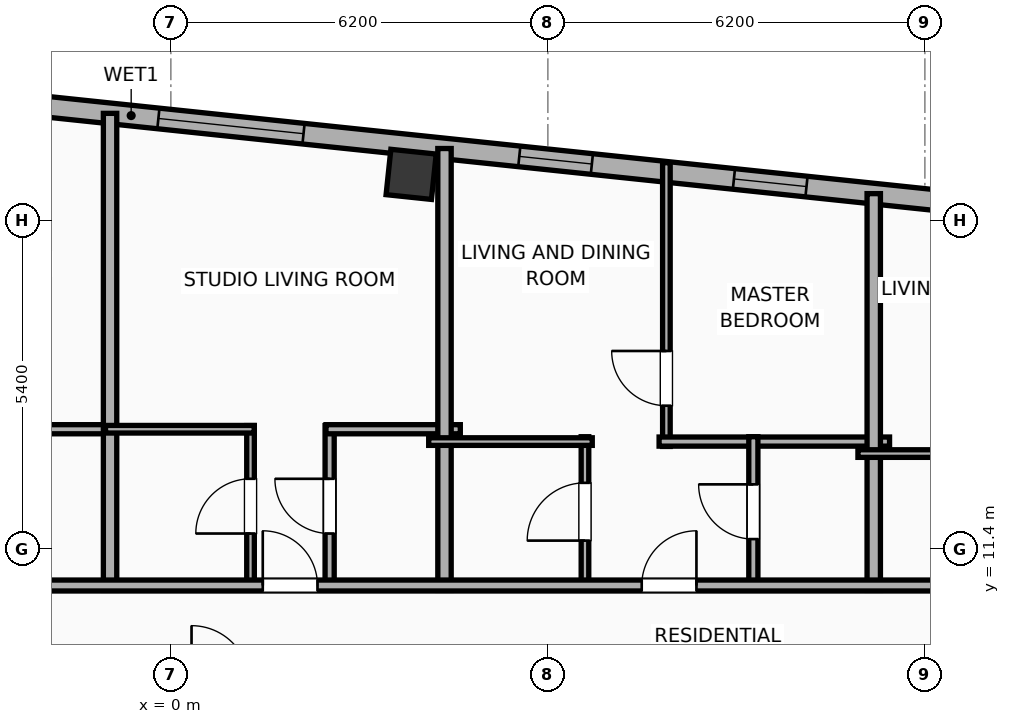
"""IFC4 building model, lengths in metres.
Left out: names, types, materials, properties, quantities, classifications, styles, units other than length and angle.
Written with IfcOpenShell. Run it as: python <this file> out.ifc"""

import sys

from ifc_helpers import new_model, si_unit, direction, frame, frame_2d, origin, origin_2d, place, context, subcontext, project, spatial, rectangle, hollow_rectangle, extrude, element, fill, save


model = new_model("IFC4")
c1 = context("Model", 3, precision=1e-05, world=origin(), true_north=direction((0.0, 1.0)))
c2 = subcontext(c1, "Body", "Model", "MODEL_VIEW")
j1 = project(units=[si_unit("LENGTHUNIT", "METRE"), si_unit("PLANEANGLEUNIT", "RADIAN")], contexts=[c1])
p1 = place(None, origin())
s1 = spatial("IfcSite", under=j1, at=p1, CompositionType="ELEMENT")
p2 = place(p1, origin())
s2 = spatial("IfcBuilding", under=s1, at=p2, CompositionType="ELEMENT")
p3 = place(p2, frame((0.0, 0.0, 279.5)))
s3 = spatial("IfcBuildingStorey", under=s2, at=p3, CompositionType="ELEMENT", Elevation=279.5)
p4 = place(p3, frame((3.952, 17.561, 0.0), z_axis=(0.0, 0.0, 1.0), x_axis=(0.994521895368, -0.104528463268, 0.0)))
e1 = element("IfcColumn", 1, at=p4, inside=s3, PredefinedType="COLUMN", context=c2, shape_type="SweptSolid", body=[
    extrude(hollow_rectangle(XDim=0.75, YDim=0.75, WallThickness=0.025, at=origin_2d()), origin(), (0.0, 0.0, 1.0), 3.9),
])
p5 = place(p3, frame((-23.908, 20.972, 0.0), z_axis=(0.0, 0.0, 1.0), x_axis=(0.994521888554, -0.104528528102, 0.0)))
e2 = element("IfcWall", 2, at=p5, inside=s3, PredefinedType="ELEMENTEDWALL", context=c2, shape_type="SweptSolid", body=[
    extrude(rectangle(XDim=46.766, YDim=0.34, at=frame_2d((23.383, 0.0))), origin(), (0.0, 0.0, 1.0), 3.65),
])
p6 = place(p5, frame((23.833, 0.0, 0.75)))
e3 = element("IfcOpeningElement", 3, at=p6, cuts=e2, PredefinedType="OPENING", context=c2, shape_type="SweptSolid", body=[
    extrude(rectangle(XDim=2.4, YDim=2.1, at=frame_2d((1.2, 1.05))), frame((0.0, 0.18, 0.0), z_axis=(0.0, -1.0, 0.0), x_axis=(1.0, 0.0, 0.0)), (0.0, 0.0, 1.0), 0.36),
])
p7 = place(p5, frame((1.243, 0.0, 0.75)))
e4 = element("IfcOpeningElement", 4, at=p7, cuts=e2, PredefinedType="OPENING", context=c2, shape_type="SweptSolid", body=[
    extrude(rectangle(XDim=1.2, YDim=2.05, at=frame_2d((0.6, 1.025))), frame((0.0, 0.18, 0.0), z_axis=(0.0, -1.0, 0.0), x_axis=(1.0, 0.0, 0.0)), (0.0, 0.0, 1.0), 0.36),
])
p8 = place(p5, frame((4.157, 0.0, 0.75)))
e5 = element("IfcOpeningElement", 5, at=p8, cuts=e2, PredefinedType="OPENING", context=c2, shape_type="SweptSolid", body=[
    extrude(rectangle(XDim=1.2, YDim=2.05, at=frame_2d((0.6, 1.025))), frame((0.0, 0.18, 0.0), z_axis=(0.0, -1.0, 0.0), x_axis=(1.0, 0.0, 0.0)), (0.0, 0.0, 1.0), 0.36),
])
p9 = place(p5, frame((7.475, 0.0, 0.75)))
e6 = element("IfcOpeningElement", 6, at=p9, cuts=e2, PredefinedType="OPENING", context=c2, shape_type="SweptSolid", body=[
    extrude(rectangle(XDim=1.2, YDim=2.05, at=frame_2d((0.6, 1.025))), frame((0.0, 0.18, 0.0), z_axis=(0.0, -1.0, 0.0), x_axis=(1.0, 0.0, 0.0)), (0.0, 0.0, 1.0), 0.36),
])
p10 = place(p5, frame((11.513, 0.0, 0.75)))
e7 = element("IfcOpeningElement", 7, at=p10, cuts=e2, PredefinedType="OPENING", context=c2, shape_type="SweptSolid", body=[
    extrude(rectangle(XDim=1.2, YDim=2.05, at=frame_2d((0.6, 1.025))), frame((0.0, 0.18, 0.0), z_axis=(0.0, -1.0, 0.0), x_axis=(1.0, 0.0, 0.0)), (0.0, 0.0, 1.0), 0.36),
])
p11 = place(p5, frame((15.192, 0.0, 0.75)))
e8 = element("IfcOpeningElement", 8, at=p11, cuts=e2, PredefinedType="OPENING", context=c2, shape_type="SweptSolid", body=[
    extrude(rectangle(XDim=1.2, YDim=2.05, at=frame_2d((0.6, 1.025))), frame((0.0, 0.18, 0.0), z_axis=(0.0, -1.0, 0.0), x_axis=(1.0, 0.0, 0.0)), (0.0, 0.0, 1.0), 0.36),
])
p12 = place(p5, frame((19.671, 0.0, 0.75)))
e9 = element("IfcOpeningElement", 9, at=p12, cuts=e2, PredefinedType="OPENING", context=c2, shape_type="SweptSolid", body=[
    extrude(rectangle(XDim=1.2, YDim=2.05, at=frame_2d((0.6, 1.025))), frame((0.0, 0.18, 0.0), z_axis=(0.0, -1.0, 0.0), x_axis=(1.0, 0.0, 0.0)), (0.0, 0.0, 1.0), 0.36),
])
p13 = place(p5, frame((29.801, 0.0, 0.75)))
e10 = element("IfcOpeningElement", 10, at=p13, cuts=e2, PredefinedType="OPENING", context=c2, shape_type="SweptSolid", body=[
    extrude(rectangle(XDim=1.2, YDim=2.05, at=frame_2d((0.6, 1.025))), frame((0.0, 0.18, 0.0), z_axis=(0.0, -1.0, 0.0), x_axis=(1.0, 0.0, 0.0)), (0.0, 0.0, 1.0), 0.36),
])
p14 = place(p5, frame((33.35, 0.0, 0.75)))
e11 = element("IfcOpeningElement", 11, at=p14, cuts=e2, PredefinedType="OPENING", context=c2, shape_type="SweptSolid", body=[
    extrude(rectangle(XDim=1.2, YDim=2.05, at=frame_2d((0.6, 1.025))), frame((0.0, 0.18, 0.0), z_axis=(0.0, -1.0, 0.0), x_axis=(1.0, 0.0, 0.0)), (0.0, 0.0, 1.0), 0.36),
])
p15 = place(p5, frame((38.034, 0.0, 0.75)))
e12 = element("IfcOpeningElement", 12, at=p15, cuts=e2, PredefinedType="OPENING", context=c2, shape_type="SweptSolid", body=[
    extrude(rectangle(XDim=0.85, YDim=2.05, at=frame_2d((0.425, 1.025))), frame((0.0, 0.18, 0.0), z_axis=(0.0, -1.0, 0.0), x_axis=(1.0, 0.0, 0.0)), (0.0, 0.0, 1.0), 0.36),
])
p16 = place(p5, frame((40.448, 0.0, 0.75)))
e13 = element("IfcOpeningElement", 13, at=p16, cuts=e2, PredefinedType="OPENING", context=c2, shape_type="SweptSolid", body=[
    extrude(rectangle(XDim=1.2, YDim=2.05, at=frame_2d((0.6, 1.025))), frame((0.0, 0.18, 0.0), z_axis=(0.0, -1.0, 0.0), x_axis=(1.0, 0.0, 0.0)), (0.0, 0.0, 1.0), 0.36),
])
p17 = place(p5, frame((43.718, 0.0, 0.75)))
e14 = element("IfcOpeningElement", 14, at=p17, cuts=e2, PredefinedType="OPENING", context=c2, shape_type="SweptSolid", body=[
    extrude(rectangle(XDim=1.2, YDim=2.05, at=frame_2d((0.6, 1.025))), frame((0.0, 0.18, 0.0), z_axis=(0.0, -1.0, 0.0), x_axis=(1.0, 0.0, 0.0)), (0.0, 0.0, 1.0), 0.36),
])
p18 = place(p3, frame((-2.949, 13.37, 0.0), z_axis=(0.0, 0.0, 1.0), x_axis=(1.0, 0.0, 0.0)))
e15 = element("IfcWall", 15, at=p18, inside=s3, PredefinedType="PLUMBINGWALL", context=c2, shape_type="SweptSolid", body=[
    extrude(rectangle(XDim=2.024, YDim=0.15, at=frame_2d((1.012, 0.0))), origin(), (0.0, 0.0, 1.0), 3.65),
])
p19 = place(p3, frame((-1.0, 10.72, 0.0), z_axis=(0.0, 0.0, 1.0), x_axis=(0.0, 1.0, 0.0)))
e16 = element("IfcWall", 16, at=p19, inside=s3, PredefinedType="PARTITIONING", context=c2, shape_type="SweptSolid", body=[
    extrude(rectangle(XDim=7.844, YDim=0.22, at=frame_2d((3.922, 0.0))), origin(), (0.0, 0.0, 1.0), 3.65),
])
p20 = place(p3, frame((1.31, 10.78, 0.0), z_axis=(0.0, 0.0, 1.0), x_axis=(0.0, 1.0, 0.0)))
e17 = element("IfcWall", 17, at=p20, inside=s3, PredefinedType="PARTITIONING", context=c2, shape_type="SweptSolid", body=[
    extrude(rectangle(XDim=2.65, YDim=0.125, at=frame_2d((1.325, 0.0))), origin(), (0.0, 0.0, 1.0), 3.65),
])
p21 = place(p20, frame((0.875, 0.0, 0.0)))
e18 = element("IfcOpeningElement", 18, at=p21, cuts=e17, PredefinedType="OPENING", context=c2, shape_type="SweptSolid", body=[
    extrude(rectangle(XDim=0.9, YDim=2.05, at=frame_2d((0.45, 1.025))), frame((0.0, 0.073, 0.0), z_axis=(0.0, -1.0, 0.0), x_axis=(1.0, 0.0, 0.0)), (0.0, 0.0, 1.0), 0.145),
])
p22 = place(p3, frame((2.611, 10.78, 0.0), z_axis=(0.0, 0.0, 1.0), x_axis=(0.0, 1.0, 0.0)))
e19 = element("IfcWall", 19, at=p22, inside=s3, PredefinedType="PLUMBINGWALL", context=c2, shape_type="SweptSolid", body=[
    extrude(rectangle(XDim=2.65, YDim=0.15, at=frame_2d((1.325, 0.0))), origin(), (0.0, 0.0, 1.0), 3.65),
])
p23 = place(p22, frame((0.875, 0.0, 0.0)))
e20 = element("IfcOpeningElement", 20, at=p23, cuts=e19, PredefinedType="OPENING", context=c2, shape_type="SweptSolid", body=[
    extrude(rectangle(XDim=0.9, YDim=2.05, at=frame_2d((0.45, 1.025))), frame((0.0, 0.085, 0.0), z_axis=(0.0, -1.0, 0.0), x_axis=(1.0, 0.0, 0.0)), (0.0, 0.0, 1.0), 0.17),
])
p24 = place(p3, frame((-1.075, 13.37, 0.0), z_axis=(0.0, 0.0, 1.0), x_axis=(1.0, 0.0, 0.0)))
e21 = element("IfcWall", 21, at=p24, inside=s3, PredefinedType="PARTITIONING", context=c2, shape_type="SweptSolid", body=[
    extrude(rectangle(XDim=2.445, YDim=0.125, at=frame_2d((1.223, 0.0))), origin(), (0.0, 0.0, 1.0), 3.65),
])
p25 = place(p3, frame((2.551, 13.37, 0.0), z_axis=(0.0, 0.0, 1.0), x_axis=(1.0, 0.0, 0.0)))
e22 = element("IfcWall", 22, at=p25, inside=s3, PredefinedType="PLUMBINGWALL", context=c2, shape_type="SweptSolid", body=[
    extrude(rectangle(XDim=2.209, YDim=0.15, at=frame_2d((1.104, 0.0))), origin(), (0.0, 0.0, 1.0), 3.65),
])
p26 = place(p3, frame((4.5, 10.72, 0.0), z_axis=(0.0, 0.0, 1.0), x_axis=(0.0, 1.0, 0.0)))
e23 = element("IfcWall", 23, at=p26, inside=s3, PredefinedType="PARTITIONING", context=c2, shape_type="SweptSolid", body=[
    extrude(rectangle(XDim=7.266, YDim=0.22, at=frame_2d((3.633, 0.0))), origin(), (0.0, 0.0, 1.0), 3.65),
])
p27 = place(p3, frame((8.149, 13.087, 0.0), z_axis=(0.0, 0.0, 1.0), x_axis=(0.0, 1.0, 0.0)))
e24 = element("IfcWall", 24, at=p27, inside=s3, PredefinedType="PARTITIONING", context=c2, shape_type="SweptSolid", body=[
    extrude(rectangle(XDim=4.667, YDim=0.125, at=frame_2d((2.333, 0.0))), origin(), (0.0, 0.0, 1.0), 3.65),
])
p28 = place(p27, frame((0.67, 0.0, 0.0)))
e25 = element("IfcOpeningElement", 25, at=p28, cuts=e24, PredefinedType="OPENING", context=c2, shape_type="SweptSolid", body=[
    extrude(rectangle(XDim=0.9, YDim=2.05, at=frame_2d((0.45, 1.025))), frame((0.0, 0.073, 0.0), z_axis=(0.0, -1.0, 0.0), x_axis=(1.0, 0.0, 0.0)), (0.0, 0.0, 1.0), 0.145),
])
p29 = place(p3, frame((8.029, 13.167, 0.0), z_axis=(0.0, 0.0, 1.0), x_axis=(1.0, 0.0, 0.0)))
e26 = element("IfcWall", 26, at=p29, inside=s3, PredefinedType="PLUMBINGWALL", context=c2, shape_type="SweptSolid", body=[
    extrude(rectangle(XDim=3.79, YDim=0.15, at=frame_2d((1.895, 0.0))), origin(), (0.0, 0.0, 1.0), 3.65),
])
p30 = place(p3, frame((6.81, 10.78, 0.0), z_axis=(0.0, 0.0, 1.0), x_axis=(0.0, 1.0, 0.0)))
e27 = element("IfcWall", 27, at=p30, inside=s3, PredefinedType="PARTITIONING", context=c2, shape_type="SweptSolid", body=[
    extrude(rectangle(XDim=2.467, YDim=0.125, at=frame_2d((1.233, 0.0))), origin(), (0.0, 0.0, 1.0), 3.65),
])
p31 = place(p30, frame((0.759, 0.0, 0.0)))
e28 = element("IfcOpeningElement", 28, at=p31, cuts=e27, PredefinedType="OPENING", context=c2, shape_type="SweptSolid", body=[
    extrude(rectangle(XDim=0.95, YDim=2.05, at=frame_2d((0.475, 1.025))), frame((0.0, 0.073, 0.0), z_axis=(0.0, -1.0, 0.0), x_axis=(1.0, 0.0, 0.0)), (0.0, 0.0, 1.0), 0.145),
])
p32 = place(p3, frame((4.24, 13.167, 0.0), z_axis=(0.0, 0.0, 1.0), x_axis=(1.0, 0.0, 0.0)))
e29 = element("IfcWall", 29, at=p32, inside=s3, PredefinedType="PARTITIONING", context=c2, shape_type="SweptSolid", body=[
    extrude(rectangle(XDim=2.69, YDim=0.125, at=frame_2d((1.345, 0.0))), origin(), (0.0, 0.0, 1.0), 3.65),
])
p33 = place(p3, frame((9.579, 10.78, 0.0), z_axis=(0.0, 0.0, 1.0), x_axis=(0.0, 1.0, 0.0)))
e30 = element("IfcWall", 30, at=p33, inside=s3, PredefinedType="PLUMBINGWALL", context=c2, shape_type="SweptSolid", body=[
    extrude(rectangle(XDim=2.467, YDim=0.15, at=frame_2d((1.233, 0.0))), origin(), (0.0, 0.0, 1.0), 3.65),
])
p34 = place(p33, frame((0.783, 0.0, 0.0)))
e31 = element("IfcOpeningElement", 31, at=p34, cuts=e30, PredefinedType="OPENING", context=c2, shape_type="SweptSolid", body=[
    extrude(rectangle(XDim=0.9, YDim=2.05, at=frame_2d((0.45, 1.025))), frame((0.0, 0.085, 0.0), z_axis=(0.0, -1.0, 0.0), x_axis=(1.0, 0.0, 0.0)), (0.0, 0.0, 1.0), 0.17),
])
p35 = place(p3, frame((11.559, 10.72, 0.0), z_axis=(0.0, 0.0, 1.0), x_axis=(0.0, 1.0, 0.0)))
e32 = element("IfcWall", 32, at=p35, inside=s3, PredefinedType="PARTITIONING", context=c2, shape_type="SweptSolid", body=[
    extrude(rectangle(XDim=6.524, YDim=0.22, at=frame_2d((3.262, 0.0))), origin(), (0.0, 0.0, 1.0), 3.65),
])
p36 = place(p3, frame((11.299, 12.97, 0.0), z_axis=(0.0, 0.0, 1.0), x_axis=(1.0, 0.0, 0.0)))
e33 = element("IfcWall", 33, at=p36, inside=s3, PredefinedType="PARTITIONING", context=c2, shape_type="SweptSolid", body=[
    extrude(rectangle(XDim=2.69, YDim=0.125, at=frame_2d((1.345, 0.0))), origin(), (0.0, 0.0, 1.0), 3.65),
])
p37 = place(p3, frame((-28.443, 10.8, 0.0), z_axis=(0.0, 0.0, 1.0), x_axis=(1.0, 0.0, 0.0)))
e34 = element("IfcWall", 34, at=p37, inside=s3, PredefinedType="PARTITIONING", context=c2, shape_type="SweptSolid", body=[
    extrude(rectangle(XDim=53.956, YDim=0.18, at=frame_2d((26.978, 0.0))), origin(), (0.0, 0.0, 1.0), 3.65),
])
p38 = place(p37, frame((3.213, 0.0, 0.0)))
e35 = element("IfcOpeningElement", 35, at=p38, cuts=e34, PredefinedType="OPENING", context=c2, shape_type="SweptSolid", body=[
    extrude(rectangle(XDim=1.15, YDim=2.05, at=frame_2d((0.575, 1.025))), frame((0.0, 0.1, 0.0), z_axis=(0.0, -1.0, 0.0), x_axis=(1.0, 0.0, 0.0)), (0.0, 0.0, 1.0), 0.2),
])
p39 = place(p37, frame((10.556, 0.0, 0.0)))
e36 = element("IfcOpeningElement", 36, at=p39, cuts=e34, PredefinedType="OPENING", context=c2, shape_type="SweptSolid", body=[
    extrude(rectangle(XDim=1.15, YDim=2.05, at=frame_2d((0.575, 1.025))), frame((0.0, 0.1, 0.0), z_axis=(0.0, -1.0, 0.0), x_axis=(1.0, 0.0, 0.0)), (0.0, 0.0, 1.0), 0.2),
])
p40 = place(p37, frame((17.872, 0.0, 0.0)))
e37 = element("IfcOpeningElement", 37, at=p40, cuts=e34, PredefinedType="OPENING", context=c2, shape_type="SweptSolid", body=[
    extrude(rectangle(XDim=1.15, YDim=2.05, at=frame_2d((0.575, 1.025))), frame((0.0, 0.1, 0.0), z_axis=(0.0, -1.0, 0.0), x_axis=(1.0, 0.0, 0.0)), (0.0, 0.0, 1.0), 0.2),
])
p41 = place(p37, frame((24.45, 0.0, 0.0)))
e38 = element("IfcOpeningElement", 38, at=p41, cuts=e34, PredefinedType="OPENING", context=c2, shape_type="SweptSolid", body=[
    extrude(rectangle(XDim=0.9, YDim=2.05, at=frame_2d((0.45, 1.025))), frame((0.0, 0.1, 0.0), z_axis=(0.0, -1.0, 0.0), x_axis=(1.0, 0.0, 0.0)), (0.0, 0.0, 1.0), 0.2),
])
p42 = place(p37, frame((29.954, 0.0, 0.0)))
e39 = element("IfcOpeningElement", 39, at=p42, cuts=e34, PredefinedType="OPENING", context=c2, shape_type="SweptSolid", body=[
    extrude(rectangle(XDim=0.9, YDim=2.05, at=frame_2d((0.45, 1.025))), frame((0.0, 0.1, 0.0), z_axis=(0.0, -1.0, 0.0), x_axis=(1.0, 0.0, 0.0)), (0.0, 0.0, 1.0), 0.2),
])
p43 = place(p37, frame((36.186, 0.0, 0.0)))
e40 = element("IfcOpeningElement", 40, at=p43, cuts=e34, PredefinedType="OPENING", context=c2, shape_type="SweptSolid", body=[
    extrude(rectangle(XDim=0.9, YDim=2.05, at=frame_2d((0.45, 1.025))), frame((0.0, 0.1, 0.0), z_axis=(0.0, -1.0, 0.0), x_axis=(1.0, 0.0, 0.0)), (0.0, 0.0, 1.0), 0.2),
])
p44 = place(p37, frame((43.249, 0.0, 0.0)))
e41 = element("IfcOpeningElement", 41, at=p44, cuts=e34, PredefinedType="OPENING", context=c2, shape_type="SweptSolid", body=[
    extrude(rectangle(XDim=0.9, YDim=2.05, at=frame_2d((0.45, 1.025))), frame((0.0, 0.1, 0.0), z_axis=(0.0, -1.0, 0.0), x_axis=(1.0, 0.0, 0.0)), (0.0, 0.0, 1.0), 0.2),
])
p45 = place(p37, frame((50.311, 0.0, 0.0)))
e42 = element("IfcOpeningElement", 42, at=p45, cuts=e34, PredefinedType="OPENING", context=c2, shape_type="SweptSolid", body=[
    extrude(rectangle(XDim=0.9, YDim=2.05, at=frame_2d((0.45, 1.025))), frame((0.0, 0.1, 0.0), z_axis=(0.0, -1.0, 0.0), x_axis=(1.0, 0.0, 0.0)), (0.0, 0.0, 1.0), 0.2),
])
p46 = place(p6, origin())
e43 = element("IfcWindow", 43, at=p46, inside=s3, PartitioningType="SINGLE_PANEL", PredefinedType="WINDOW", context=c2, shape_type="SweptSolid", body=[
    extrude(rectangle(XDim=2.4, YDim=2.1, at=frame_2d((1.2, 1.05))), frame((0.0, 0.03, 0.0), z_axis=(0.0, -1.0, 0.0), x_axis=(1.0, 0.0, 0.0)), (0.0, 0.0, 1.0), 0.06),
])
fill(e3, e43)
p47 = place(p13, origin())
e44 = element("IfcWindow", 44, at=p47, inside=s3, PartitioningType="SINGLE_PANEL", PredefinedType="WINDOW", context=c2, shape_type="SweptSolid", body=[
    extrude(rectangle(XDim=1.2, YDim=2.05, at=frame_2d((0.6, 1.025))), frame((0.0, 0.03, 0.0), z_axis=(0.0, -1.0, 0.0), x_axis=(1.0, 0.0, 0.0)), (0.0, 0.0, 1.0), 0.06),
])
fill(e10, e44)
p48 = place(p14, origin())
e45 = element("IfcWindow", 45, at=p48, inside=s3, PartitioningType="SINGLE_PANEL", PredefinedType="WINDOW", context=c2, shape_type="SweptSolid", body=[
    extrude(rectangle(XDim=1.2, YDim=2.05, at=frame_2d((0.6, 1.025))), frame((0.0, 0.03, 0.0), z_axis=(0.0, -1.0, 0.0), x_axis=(1.0, 0.0, 0.0)), (0.0, 0.0, 1.0), 0.06),
])
fill(e11, e45)
p49 = place(p21, origin())
e46 = element("IfcDoor", 46, at=p49, inside=s3, OperationType="SINGLE_SWING_LEFT", PredefinedType="DOOR", context=c2, shape_type="SweptSolid", body=[
    extrude(rectangle(XDim=0.9, YDim=2.05, at=frame_2d((0.45, 1.025))), frame((0.0, 0.025, 0.0), z_axis=(0.0, -1.0, 0.0), x_axis=(1.0, 0.0, 0.0)), (0.0, 0.0, 1.0), 0.05),
])
fill(e18, e46)
p50 = place(p23, origin())
e47 = element("IfcDoor", 47, at=p50, inside=s3, OperationType="SINGLE_SWING_RIGHT", PredefinedType="DOOR", context=c2, shape_type="SweptSolid", body=[
    extrude(rectangle(XDim=0.9, YDim=2.05, at=frame_2d((0.45, 1.025))), frame((0.0, 0.025, 0.0), z_axis=(0.0, -1.0, 0.0), x_axis=(1.0, 0.0, 0.0)), (0.0, 0.0, 1.0), 0.05),
])
fill(e20, e47)
p51 = place(p28, origin())
e48 = element("IfcDoor", 48, at=p51, inside=s3, OperationType="SINGLE_SWING_RIGHT", PredefinedType="DOOR", context=c2, shape_type="SweptSolid", body=[
    extrude(rectangle(XDim=0.9, YDim=2.05, at=frame_2d((0.45, 1.025))), frame((0.0, 0.025, 0.0), z_axis=(0.0, -1.0, 0.0), x_axis=(1.0, 0.0, 0.0)), (0.0, 0.0, 1.0), 0.05),
])
fill(e25, e48)
p52 = place(p31, origin())
e49 = element("IfcDoor", 49, at=p52, inside=s3, OperationType="SINGLE_SWING_LEFT", PredefinedType="DOOR", context=c2, shape_type="SweptSolid", body=[
    extrude(rectangle(XDim=0.95, YDim=2.05, at=frame_2d((0.475, 1.025))), frame((0.0, 0.025, 0.0), z_axis=(0.0, -1.0, 0.0), x_axis=(1.0, 0.0, 0.0)), (0.0, 0.0, 1.0), 0.05),
])
fill(e28, e49)
p53 = place(p34, origin())
e50 = element("IfcDoor", 50, at=p53, inside=s3, OperationType="SINGLE_SWING_RIGHT", PredefinedType="DOOR", context=c2, shape_type="SweptSolid", body=[
    extrude(rectangle(XDim=0.9, YDim=2.05, at=frame_2d((0.45, 1.025))), frame((0.0, 0.025, 0.0), z_axis=(0.0, -1.0, 0.0), x_axis=(1.0, 0.0, 0.0)), (0.0, 0.0, 1.0), 0.05),
])
fill(e31, e50)
p54 = place(p42, origin())
e51 = element("IfcDoor", 51, at=p54, inside=s3, OperationType="SINGLE_SWING_LEFT", PredefinedType="DOOR", context=c2, shape_type="SweptSolid", body=[
    extrude(rectangle(XDim=0.9, YDim=2.05, at=frame_2d((0.45, 1.025))), frame((0.0, 0.025, 0.0), z_axis=(0.0, -1.0, 0.0), x_axis=(1.0, 0.0, 0.0)), (0.0, 0.0, 1.0), 0.05),
])
fill(e39, e51)
p55 = place(p43, origin())
e52 = element("IfcDoor", 52, at=p55, inside=s3, OperationType="SINGLE_SWING_RIGHT", PredefinedType="DOOR", context=c2, shape_type="SweptSolid", body=[
    extrude(rectangle(XDim=0.9, YDim=2.05, at=frame_2d((0.45, 1.025))), frame((0.0, 0.025, 0.0), z_axis=(0.0, -1.0, 0.0), x_axis=(1.0, 0.0, 0.0)), (0.0, 0.0, 1.0), 0.05),
])
fill(e40, e52)
save(model, sys.argv[1])
